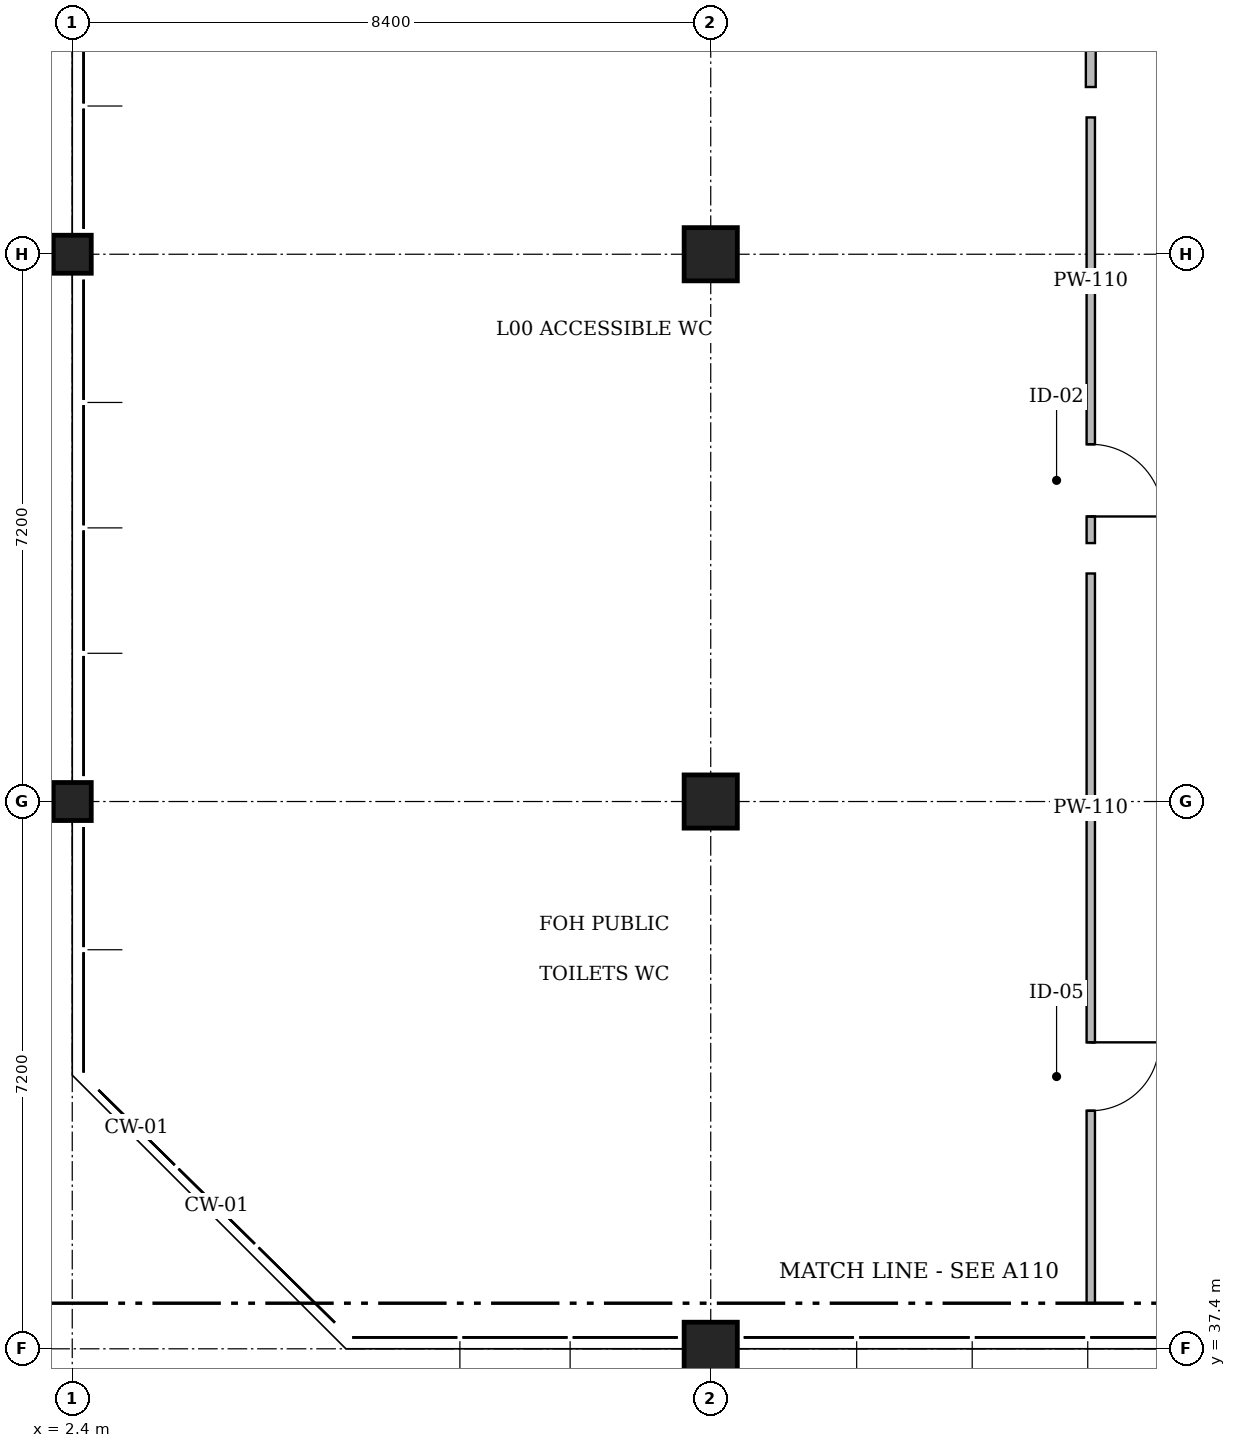
"""IFC4 building model, lengths in metres.
Left out: names, types, materials, properties, quantities, classifications, styles, units other than length and angle.
Written with IfcOpenShell. Run it as: python <this file> out.ifc"""

import sys

from ifc_helpers import new_model, si_unit, direction, frame, frame_2d, origin, origin_2d, place, context, subcontext, project, spatial, rectangle, extrude, element, fill, save


model = new_model("IFC4")
c1 = context("Model", 3, precision=1e-05, world=origin(), true_north=direction((0.0, 1.0)))
c2 = subcontext(c1, "Body", "Model", "MODEL_VIEW")
j1 = project(units=[si_unit("LENGTHUNIT", "METRE"), si_unit("PLANEANGLEUNIT", "RADIAN")], contexts=[c1])
p1 = place(None, origin())
s1 = spatial("IfcSite", under=j1, at=p1, CompositionType="ELEMENT")
p2 = place(p1, origin())
s2 = spatial("IfcBuilding", under=s1, at=p2, CompositionType="ELEMENT")
p3 = place(p2, origin())
s3 = spatial("IfcBuildingStorey", under=s2, at=p3, CompositionType="ELEMENT", Elevation=0.0)
for number, where, z_axis, x_axis in (
    (1, (2.4, 44.6, 0.0), (0.0, 0.0, 1.0), (1.0, 0.0, 0.0)),
    (2, (2.4, 51.8, 0.0), (0.0, 0.0, 1.0), (1.0, 0.0, 0.0)),
):
    element("IfcColumn", number, at=place(p3, frame(where, z_axis=z_axis, x_axis=x_axis)), inside=s3, PredefinedType="COLUMN", context=c2, shape_type="SweptSolid", body=[
        extrude(rectangle(XDim=0.5, YDim=0.5, at=origin_2d()), origin(), (0.0, 0.0, 1.0), 4.8),
    ])
p4 = place(p3, frame((10.8, 37.4, 0.0), z_axis=(0.0, 0.0, 1.0), x_axis=(1.0, 0.0, 0.0)))
e3 = element("IfcColumn", 3, at=p4, inside=s3, PredefinedType="COLUMN", context=c2, shape_type="SweptSolid", body=[
    extrude(rectangle(XDim=0.7, YDim=0.7, at=origin_2d()), origin(), (0.0, 0.0, 1.0), 4.66),
])
for number, where, z_axis, x_axis in (
    (4, (10.8, 44.6, 0.0), (0.0, 0.0, 1.0), (1.0, 0.0, 0.0)),
    (5, (10.8, 51.8, 0.0), (0.0, 0.0, 1.0), (1.0, 0.0, 0.0)),
):
    element("IfcColumn", number, at=place(p3, frame(where, z_axis=z_axis, x_axis=x_axis)), inside=s3, PredefinedType="COLUMN", context=c2, shape_type="SweptSolid", body=[
        extrude(rectangle(XDim=0.7, YDim=0.7, at=origin_2d()), origin(), (0.0, 0.0, 1.0), 4.8),
    ])
p5 = place(p3, frame((15.8, 47.6, 0.0), z_axis=(0.0, 0.0, 1.0), x_axis=(0.0, -1.0, 0.0)))
e6 = element("IfcWall", 6, at=p5, inside=s3, PredefinedType="PARTITIONING", context=c2, shape_type="SweptSolid", body=[
    extrude(rectangle(XDim=9.6, YDim=0.11, at=frame_2d((4.8, 0.0))), origin(), (0.0, 0.0, 1.0), 4.56),
])
p6 = place(p5, frame((6.168, 0.0, 0.0)))
e7 = element("IfcOpeningElement", 7, at=p6, cuts=e6, PredefinedType="OPENING", context=c2, shape_type="SweptSolid", body=[
    extrude(rectangle(XDim=0.9, YDim=2.15, at=frame_2d((0.45, 1.075))), frame((0.0, 0.075, 0.0), z_axis=(0.0, -1.0, 0.0), x_axis=(1.0, 0.0, 0.0)), (0.0, 0.0, 1.0), 0.15),
])
p7 = place(p3, frame((15.8, 53.6, 0.0), z_axis=(0.0, 0.0, 1.0), x_axis=(0.0, -1.0, 0.0)))
e8 = element("IfcWall", 8, at=p7, inside=s3, PredefinedType="PARTITIONING", context=c2, shape_type="SweptSolid", body=[
    extrude(rectangle(XDim=5.6, YDim=0.11, at=frame_2d((2.8, 0.0))), origin(), (0.0, 0.0, 1.0), 4.54),
])
p8 = place(p7, frame((4.3, 0.0, 0.0)))
e9 = element("IfcOpeningElement", 9, at=p8, cuts=e8, PredefinedType="OPENING", context=c2, shape_type="SweptSolid", body=[
    extrude(rectangle(XDim=0.95, YDim=2.1, at=frame_2d((0.475, 1.05))), frame((0.0, 0.075, 0.0), z_axis=(0.0, -1.0, 0.0), x_axis=(1.0, 0.0, 0.0)), (0.0, 0.0, 1.0), 0.15),
])
p9 = place(p3, frame((15.8, 76.4, 0.0), z_axis=(0.0, 0.0, 1.0), x_axis=(0.0, -1.0, 0.0)))
e10 = element("IfcWall", 10, at=p9, inside=s3, PredefinedType="PARTITIONING", context=c2, shape_type="SweptSolid", body=[
    extrude(rectangle(XDim=22.4, YDim=0.13, at=frame_2d((11.2, 0.0))), origin(), (0.0, 0.0, 1.0), 4.54),
])
p10 = place(p9, frame((20.353, 0.0, 0.0)))
e11 = element("IfcOpeningElement", 11, at=p10, cuts=e10, PredefinedType="OPENING", context=c2, shape_type="SweptSolid", body=[
    extrude(rectangle(XDim=1.45, YDim=2.2, at=frame_2d((0.725, 1.1))), frame((0.0, 0.085, 0.0), z_axis=(0.0, -1.0, 0.0), x_axis=(1.0, 0.0, 0.0)), (0.0, 0.0, 1.0), 0.17),
])
p11 = place(p6, origin())
e12 = element("IfcDoor", 12, at=p11, inside=s3, OperationType="SINGLE_SWING_LEFT", PredefinedType="DOOR", context=c2, shape_type="SweptSolid", body=[
    extrude(rectangle(XDim=0.9, YDim=2.15, at=frame_2d((0.45, 1.075))), frame((0.0, 0.025, 0.0), z_axis=(0.0, -1.0, 0.0), x_axis=(1.0, 0.0, 0.0)), (0.0, 0.0, 1.0), 0.05),
])
fill(e7, e12)
p12 = place(p8, origin())
e13 = element("IfcDoor", 13, at=p12, inside=s3, OperationType="SINGLE_SWING_RIGHT", PredefinedType="DOOR", context=c2, shape_type="SweptSolid", body=[
    extrude(rectangle(XDim=0.95, YDim=2.1, at=frame_2d((0.475, 1.05))), frame((0.0, 0.025, 0.0), z_axis=(0.0, -1.0, 0.0), x_axis=(1.0, 0.0, 0.0)), (0.0, 0.0, 1.0), 0.05),
])
fill(e9, e13)
save(model, sys.argv[1])
